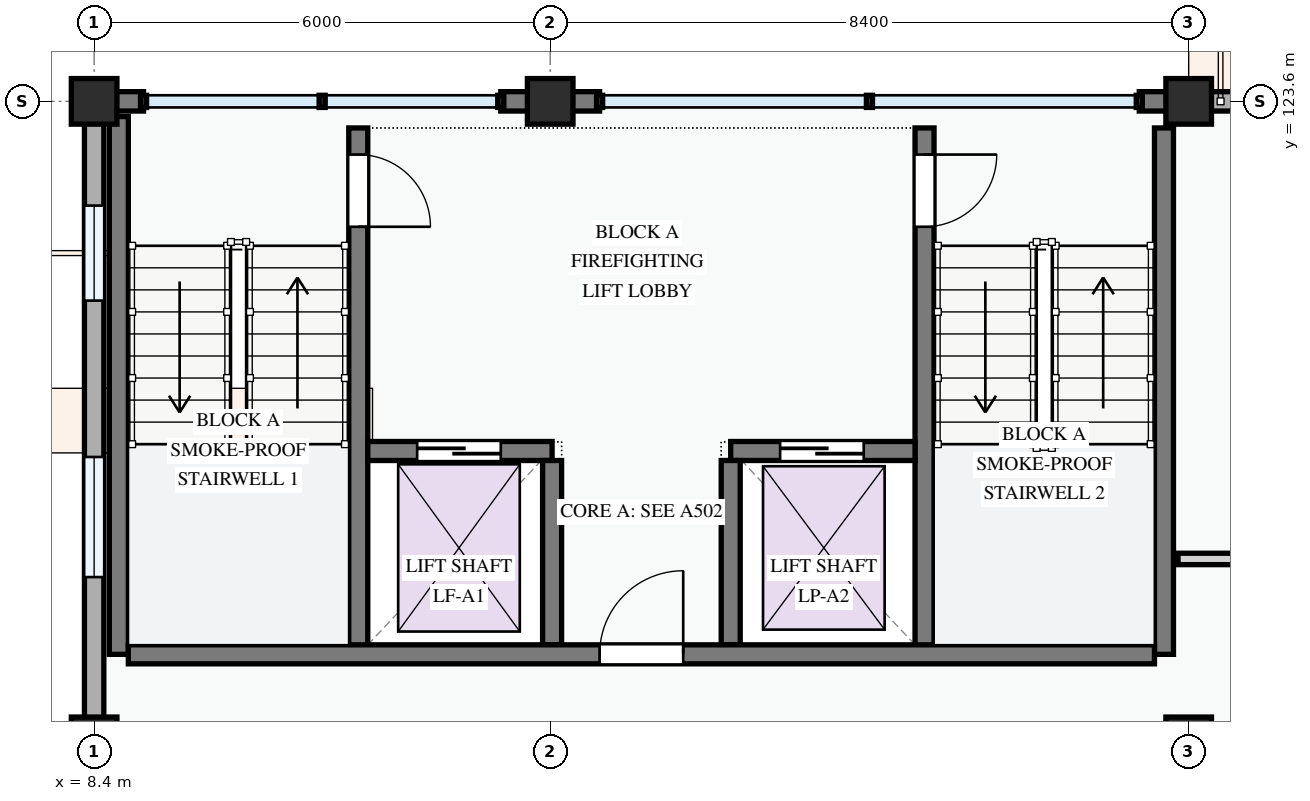
"""IFC4 building model, lengths in metres.
Left out: names, types, materials, properties, quantities, classifications, styles, units other than length and angle.
Written with IfcOpenShell. Run it as: python <this file> out.ifc"""

import sys

from ifc_helpers import new_model, si_unit, direction, frame, frame_2d, origin, origin_2d, place, context, subcontext, project, spatial, rectangle, extrude, element, fill, save


model = new_model("IFC4")
c1 = context("Model", 3, precision=1e-05, world=origin(), true_north=direction((0.0, 1.0)))
c2 = subcontext(c1, "Body", "Model", "MODEL_VIEW")
j1 = project(units=[si_unit("LENGTHUNIT", "METRE"), si_unit("PLANEANGLEUNIT", "RADIAN")], contexts=[c1])
p1 = place(None, origin())
s1 = spatial("IfcSite", under=j1, at=p1, CompositionType="ELEMENT")
p2 = place(p1, origin())
s2 = spatial("IfcBuilding", under=s1, at=p2, CompositionType="ELEMENT")
p3 = place(p2, frame((0.0, 0.0, 37.8)))
s3 = spatial("IfcBuildingStorey", under=s2, at=p3, CompositionType="ELEMENT", Elevation=37.8)
for number, where, z_axis, x_axis in (
    (1, (8.4, 115.2, 0.0), (0.0, 0.0, 1.0), (1.0, 0.0, 0.0)),
    (2, (8.4, 123.6, 0.0), (0.0, 0.0, 1.0), (1.0, 0.0, 0.0)),
    (3, (14.4, 123.6, 0.0), (0.0, 0.0, 1.0), (1.0, 0.0, 0.0)),
    (4, (22.8, 115.2, 0.0), (0.0, 0.0, 1.0), (1.0, 0.0, 0.0)),
    (5, (22.8, 123.6, 0.0), (0.0, 0.0, 1.0), (1.0, 0.0, 0.0)),
):
    element("IfcColumn", number, at=place(p3, frame(where, z_axis=z_axis, x_axis=x_axis)), inside=s3, PredefinedType="COLUMN", context=c2, shape_type="SweptSolid", body=[
        extrude(rectangle(XDim=0.6, YDim=0.6, at=origin_2d()), origin(), (0.0, 0.0, 1.0), 3.3),
    ])
p4 = place(p3, frame((28.8, 123.6, 0.0), z_axis=(0.0, 0.0, 1.0), x_axis=(-1.0, 0.0, 0.0)))
e6 = element("IfcWall", 6, at=p4, inside=s3, PredefinedType="STANDARD", context=c2, shape_type="SweptSolid", body=[
    extrude(rectangle(XDim=6.0, YDim=0.255, at=frame_2d((3.0, 0.0))), origin(), (0.0, 0.0, 1.0), 2.525),
])
p5 = place(p4, frame((0.62, 0.0, 0.0)))
e7 = element("IfcOpeningElement", 7, at=p5, cuts=e6, PredefinedType="OPENING", context=c2, shape_type="SweptSolid", body=[
    extrude(rectangle(XDim=1.05, YDim=2.15, at=frame_2d((0.525, 1.075))), frame((0.0, 0.137, 0.0), z_axis=(0.0, -1.0, 0.0), x_axis=(1.0, 0.0, 0.0)), (0.0, 0.0, 1.0), 0.275),
])
p6 = place(p4, frame((2.965, 0.0, 0.78)))
e8 = element("IfcOpeningElement", 8, at=p6, cuts=e6, PredefinedType="OPENING", context=c2, shape_type="SweptSolid", body=[
    extrude(rectangle(XDim=1.6, YDim=1.55, at=frame_2d((0.8, 0.775))), frame((0.0, 0.137, 0.0), z_axis=(0.0, -1.0, 0.0), x_axis=(1.0, 0.0, 0.0)), (0.0, 0.0, 1.0), 0.275),
])
for number, where, z_axis, x_axis in (
    (9, (22.8, 123.6, 0.0), (0.0, 0.0, 1.0), (-1.0, 0.0, 0.0)),
    (10, (15.05, 123.6, 0.0), (0.0, 0.0, 1.0), (-1.0, 0.0, 0.0)),
):
    element("IfcWall", number, at=place(p3, frame(where, z_axis=z_axis, x_axis=x_axis)), inside=s3, PredefinedType="STANDARD", context=c2, shape_type="SweptSolid", body=[
        extrude(rectangle(XDim=0.65, YDim=0.255, at=frame_2d((0.325, 0.0))), origin(), (0.0, 0.0, 1.0), 3.04),
    ])
p7 = place(p3, frame((14.4, 123.6, 0.0), z_axis=(0.0, 0.0, 1.0), x_axis=(-1.0, 0.0, 0.0)))
e11 = element("IfcWall", 11, at=p7, inside=s3, PredefinedType="STANDARD", context=c2, shape_type="SweptSolid", body=[
    extrude(rectangle(XDim=0.65, YDim=0.255, at=frame_2d((0.325, 0.0))), origin(), (0.0, 0.0, 1.0), 3.04),
])
p8 = place(p3, frame((9.05, 123.6, 0.0), z_axis=(0.0, 0.0, 1.0), x_axis=(-1.0, 0.0, 0.0)))
e12 = element("IfcWall", 12, at=p8, inside=s3, PredefinedType="STANDARD", context=c2, shape_type="SweptSolid", body=[
    extrude(rectangle(XDim=0.521, YDim=0.255, at=frame_2d((0.26, 0.0))), origin(), (0.0, 0.0, 1.0), 3.04),
])
p9 = place(p3, frame((8.4, 123.6, 0.0), z_axis=(0.0, 0.0, 1.0), x_axis=(0.0, -1.0, 0.0)))
e13 = element("IfcWall", 13, at=p9, inside=s3, PredefinedType="STANDARD", context=c2, shape_type="SweptSolid", body=[
    extrude(rectangle(XDim=8.4, YDim=0.255, at=frame_2d((4.2, 0.0))), origin(), (0.0, 0.0, 1.0), 2.425),
])
p10 = place(p9, frame((1.371, 0.0, 0.78)))
e14 = element("IfcOpeningElement", 14, at=p10, cuts=e13, PredefinedType="OPENING", context=c2, shape_type="SweptSolid", body=[
    extrude(rectangle(XDim=1.25, YDim=1.3, at=frame_2d((0.625, 0.65))), frame((0.0, 0.137, 0.0), z_axis=(0.0, -1.0, 0.0), x_axis=(1.0, 0.0, 0.0)), (0.0, 0.0, 1.0), 0.275),
])
p11 = place(p9, frame((4.679, 0.0, 0.78)))
e15 = element("IfcOpeningElement", 15, at=p11, cuts=e13, PredefinedType="OPENING", context=c2, shape_type="SweptSolid", body=[
    extrude(rectangle(XDim=1.58, YDim=1.48, at=frame_2d((0.79, 0.74))), frame((0.0, 0.137, 0.0), z_axis=(0.0, -1.0, 0.0), x_axis=(1.0, 0.0, 0.0)), (0.0, 0.0, 1.0), 0.275),
])
p12 = place(p3, frame((11.875, 123.25, 0.0), z_axis=(0.0, 0.0, 1.0), x_axis=(0.0, -1.0, 0.0)))
e16 = element("IfcWall", 16, at=p12, inside=s3, PredefinedType="SHEAR", context=c2, shape_type="SweptSolid", body=[
    extrude(rectangle(XDim=6.925, YDim=0.25, at=frame_2d((3.462, 0.0))), origin(), (0.0, 0.0, 1.0), 3.0),
])
p13 = place(p12, frame((0.35, 0.0, 0.0)))
e17 = element("IfcOpeningElement", 17, at=p13, cuts=e16, PredefinedType="OPENING", context=c2, shape_type="SweptSolid", body=[
    extrude(rectangle(XDim=0.95, YDim=2.1, at=frame_2d((0.475, 1.05))), frame((0.0, 0.135, 0.0), z_axis=(0.0, -1.0, 0.0), x_axis=(1.0, 0.0, 0.0)), (0.0, 0.0, 1.0), 0.27),
])
p14 = place(p3, frame((8.725, 123.4, 0.0), z_axis=(0.0, 0.0, 1.0), x_axis=(0.0, -1.0, 0.0)))
e18 = element("IfcWall", 18, at=p14, inside=s3, PredefinedType="SHEAR", context=c2, shape_type="SweptSolid", body=[
    extrude(rectangle(XDim=7.075, YDim=0.25, at=frame_2d((3.538, 0.0))), origin(), (0.0, 0.0, 1.0), 3.0),
])
p15 = place(p3, frame((22.475, 123.25, 0.0), z_axis=(0.0, 0.0, 1.0), x_axis=(0.0, -1.0, 0.0)))
e19 = element("IfcWall", 19, at=p15, inside=s3, PredefinedType="SHEAR", context=c2, shape_type="SweptSolid", body=[
    extrude(rectangle(XDim=6.925, YDim=0.25, at=frame_2d((3.462, 0.0))), origin(), (0.0, 0.0, 1.0), 3.0),
])
p16 = place(p3, frame((19.325, 123.25, 0.0), z_axis=(0.0, 0.0, 1.0), x_axis=(0.0, -1.0, 0.0)))
e20 = element("IfcWall", 20, at=p16, inside=s3, PredefinedType="SHEAR", context=c2, shape_type="SweptSolid", body=[
    extrude(rectangle(XDim=6.925, YDim=0.25, at=frame_2d((3.462, 0.0))), origin(), (0.0, 0.0, 1.0), 3.0),
])
p17 = place(p16, frame((0.35, 0.0, 0.0)))
e21 = element("IfcOpeningElement", 21, at=p17, cuts=e20, PredefinedType="OPENING", context=c2, shape_type="SweptSolid", body=[
    extrude(rectangle(XDim=0.95, YDim=2.1, at=frame_2d((0.475, 1.05))), frame((0.0, 0.135, 0.0), z_axis=(0.0, -1.0, 0.0), x_axis=(1.0, 0.0, 0.0)), (0.0, 0.0, 1.0), 0.27),
])
p18 = place(p3, frame((12.0, 119.0, 0.0), z_axis=(0.0, 0.0, 1.0), x_axis=(1.0, 0.0, 0.0)))
e22 = element("IfcWall", 22, at=p18, inside=s3, PredefinedType="SHEAR", context=c2, shape_type="SweptSolid", body=[
    extrude(rectangle(XDim=2.425, YDim=0.25, at=frame_2d((1.212, 0.0))), origin(), (0.0, 0.0, 1.0), 3.0),
])
p19 = place(p18, frame((0.65, 0.0, 0.0)))
e23 = element("IfcOpeningElement", 23, at=p19, cuts=e22, PredefinedType="OPENING", context=c2, shape_type="SweptSolid", body=[
    extrude(rectangle(XDim=1.1, YDim=2.15, at=frame_2d((0.55, 1.075))), frame((0.0, 0.135, 0.0), z_axis=(0.0, -1.0, 0.0), x_axis=(1.0, 0.0, 0.0)), (0.0, 0.0, 1.0), 0.27),
])
p20 = place(p3, frame((16.775, 119.0, 0.0), z_axis=(0.0, 0.0, 1.0), x_axis=(1.0, 0.0, 0.0)))
e24 = element("IfcWall", 24, at=p20, inside=s3, PredefinedType="SHEAR", context=c2, shape_type="SweptSolid", body=[
    extrude(rectangle(XDim=2.425, YDim=0.25, at=frame_2d((1.212, 0.0))), origin(), (0.0, 0.0, 1.0), 3.0),
])
p21 = place(p20, frame((0.65, 0.0, 0.0)))
e25 = element("IfcOpeningElement", 25, at=p21, cuts=e24, PredefinedType="OPENING", context=c2, shape_type="SweptSolid", body=[
    extrude(rectangle(XDim=1.1, YDim=2.15, at=frame_2d((0.55, 1.075))), frame((0.0, 0.135, 0.0), z_axis=(0.0, -1.0, 0.0), x_axis=(1.0, 0.0, 0.0)), (0.0, 0.0, 1.0), 0.27),
])
for number, where, z_axis, x_axis in (
    (26, (14.425, 118.875, 0.0), (0.0, 0.0, 1.0), (0.0, -1.0, 0.0)),
    (27, (16.775, 118.875, 0.0), (0.0, 0.0, 1.0), (0.0, -1.0, 0.0)),
):
    element("IfcWall", number, at=place(p3, frame(where, z_axis=z_axis, x_axis=x_axis)), inside=s3, PredefinedType="SHEAR", context=c2, shape_type="SweptSolid", body=[
        extrude(rectangle(XDim=2.425, YDim=0.25, at=frame_2d((1.212, 0.0))), origin(), (0.0, 0.0, 1.0), 3.0),
    ])
p22 = place(p3, frame((8.85, 116.325, 0.0), z_axis=(0.0, 0.0, 1.0), x_axis=(1.0, 0.0, 0.0)))
e28 = element("IfcWall", 28, at=p22, inside=s3, PredefinedType="SHEAR", context=c2, shape_type="SweptSolid", body=[
    extrude(rectangle(XDim=13.5, YDim=0.25, at=frame_2d((6.75, 0.0))), origin(), (0.0, 0.0, 1.0), 3.0),
])
p23 = place(p22, frame((6.2, 0.0, 0.0)))
e29 = element("IfcOpeningElement", 29, at=p23, cuts=e28, PredefinedType="OPENING", context=c2, shape_type="SweptSolid", body=[
    extrude(rectangle(XDim=1.1, YDim=2.15, at=frame_2d((0.55, 1.075))), frame((0.0, 0.135, 0.0), z_axis=(0.0, -1.0, 0.0), x_axis=(1.0, 0.0, 0.0)), (0.0, 0.0, 1.0), 0.27),
])
p24 = place(p3, frame((22.66, 117.58, 0.0), z_axis=(0.0, 0.0, 1.0), x_axis=(1.0, 0.0, 0.0)))
e30 = element("IfcWall", 30, at=p24, inside=s3, PredefinedType="PARTITIONING", context=c2, shape_type="SweptSolid", body=[
    extrude(rectangle(XDim=14.411, YDim=0.15, at=frame_2d((7.205, 0.0))), origin(), (0.0, 0.0, 1.0), 3.0),
])
p25 = place(p24, frame((2.74, 0.0, 0.0)))
e31 = element("IfcOpeningElement", 31, at=p25, cuts=e30, PredefinedType="OPENING", context=c2, shape_type="SweptSolid", body=[
    extrude(rectangle(XDim=0.92, YDim=2.1, at=frame_2d((0.46, 1.05))), frame((0.0, 0.085, 0.0), z_axis=(0.0, -1.0, 0.0), x_axis=(1.0, 0.0, 0.0)), (0.0, 0.0, 1.0), 0.17),
])
p26 = place(p10, origin())
e32 = element("IfcWindow", 32, at=p26, inside=s3, PartitioningType="SINGLE_PANEL", PredefinedType="WINDOW", context=c2, shape_type="SweptSolid", body=[
    extrude(rectangle(XDim=1.25, YDim=1.3, at=frame_2d((0.625, 0.65))), frame((0.0, 0.03, 0.0), z_axis=(0.0, -1.0, 0.0), x_axis=(1.0, 0.0, 0.0)), (0.0, 0.0, 1.0), 0.06),
])
fill(e14, e32)
p27 = place(p11, origin())
e33 = element("IfcWindow", 33, at=p27, inside=s3, PartitioningType="SINGLE_PANEL", PredefinedType="WINDOW", context=c2, shape_type="SweptSolid", body=[
    extrude(rectangle(XDim=1.58, YDim=1.48, at=frame_2d((0.79, 0.74))), frame((0.0, 0.03, 0.0), z_axis=(0.0, -1.0, 0.0), x_axis=(1.0, 0.0, 0.0)), (0.0, 0.0, 1.0), 0.06),
])
fill(e15, e33)
p28 = place(p13, origin())
e34 = element("IfcDoor", 34, at=p28, inside=s3, OperationType="SINGLE_SWING_RIGHT", PredefinedType="DOOR", context=c2, shape_type="SweptSolid", body=[
    extrude(rectangle(XDim=0.95, YDim=2.1, at=frame_2d((0.475, 1.05))), frame((0.0, 0.025, 0.0), z_axis=(0.0, -1.0, 0.0), x_axis=(1.0, 0.0, 0.0)), (0.0, 0.0, 1.0), 0.05),
])
fill(e17, e34)
p29 = place(p17, origin())
e35 = element("IfcDoor", 35, at=p29, inside=s3, OperationType="SINGLE_SWING_LEFT", PredefinedType="DOOR", context=c2, shape_type="SweptSolid", body=[
    extrude(rectangle(XDim=0.95, YDim=2.1, at=frame_2d((0.475, 1.05))), frame((0.0, 0.025, 0.0), z_axis=(0.0, -1.0, 0.0), x_axis=(1.0, 0.0, 0.0)), (0.0, 0.0, 1.0), 0.05),
])
fill(e21, e35)
p30 = place(p19, origin())
e36 = element("IfcDoor", 36, at=p30, inside=s3, OperationType="SLIDING_TO_LEFT", PredefinedType="DOOR", context=c2, shape_type="SweptSolid", body=[
    extrude(rectangle(XDim=1.1, YDim=2.15, at=frame_2d((0.55, 1.075))), frame((0.0, 0.025, 0.0), z_axis=(0.0, -1.0, 0.0), x_axis=(1.0, 0.0, 0.0)), (0.0, 0.0, 1.0), 0.05),
])
fill(e23, e36)
p31 = place(p21, origin())
e37 = element("IfcDoor", 37, at=p31, inside=s3, OperationType="SLIDING_TO_LEFT", PredefinedType="DOOR", context=c2, shape_type="SweptSolid", body=[
    extrude(rectangle(XDim=1.1, YDim=2.15, at=frame_2d((0.55, 1.075))), frame((0.0, 0.025, 0.0), z_axis=(0.0, -1.0, 0.0), x_axis=(1.0, 0.0, 0.0)), (0.0, 0.0, 1.0), 0.05),
])
fill(e25, e37)
p32 = place(p23, origin())
e38 = element("IfcDoor", 38, at=p32, inside=s3, OperationType="SINGLE_SWING_RIGHT", PredefinedType="DOOR", context=c2, shape_type="SweptSolid", body=[
    extrude(rectangle(XDim=1.1, YDim=2.15, at=frame_2d((0.55, 1.075))), frame((0.0, 0.025, 0.0), z_axis=(0.0, -1.0, 0.0), x_axis=(1.0, 0.0, 0.0)), (0.0, 0.0, 1.0), 0.05),
])
fill(e29, e38)
save(model, sys.argv[1])
